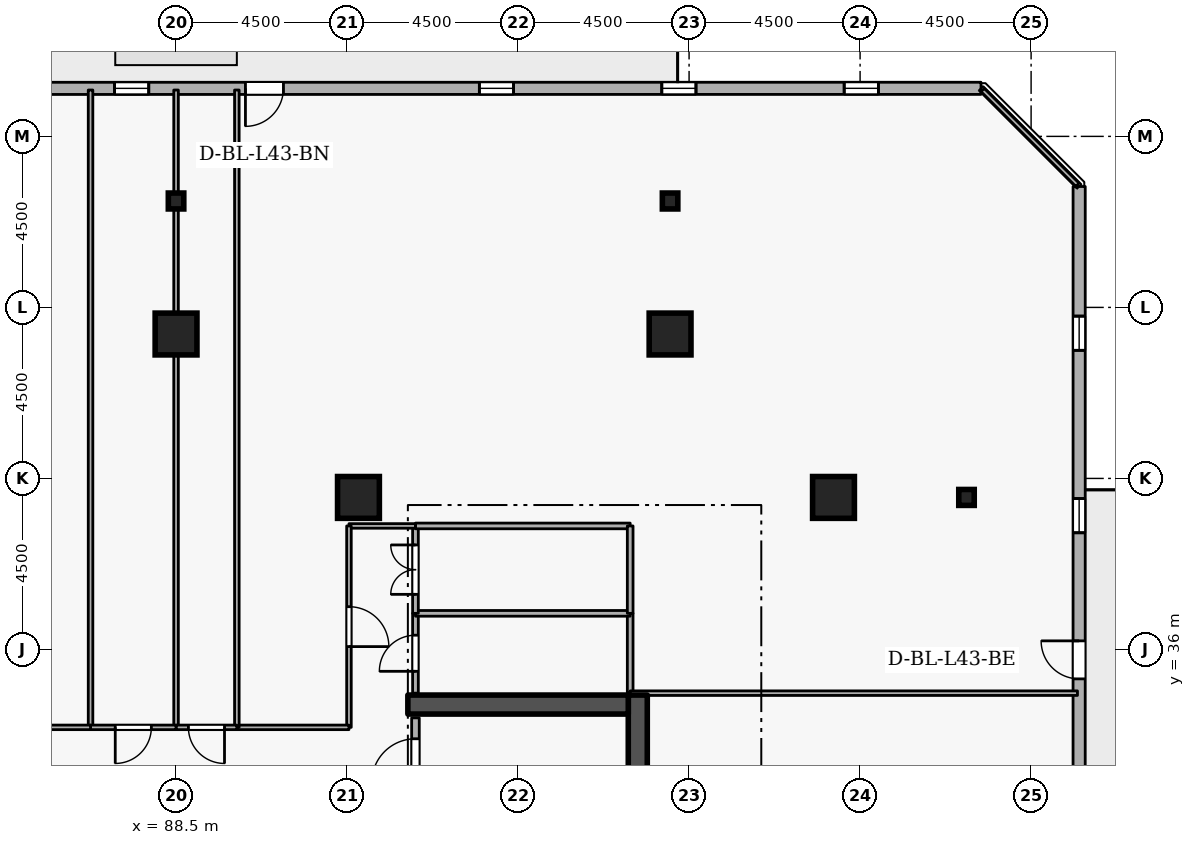
"""IFC4 building model, lengths in metres.
Left out: names, types, materials, properties, quantities, classifications, styles, units other than length and angle.
Written with IfcOpenShell. Run it as: python <this file> out.ifc"""

import sys

from ifc_helpers import new_model, si_unit, direction, frame, frame_2d, origin, origin_2d, place, context, subcontext, project, spatial, rectangle, i_section, extrude, element, fill, save


model = new_model("IFC4")
c1 = context("Model", 3, precision=1e-05, world=origin(), true_north=direction((0.0, 1.0)))
c2 = subcontext(c1, "Body", "Model", "MODEL_VIEW")
j1 = project(units=[si_unit("LENGTHUNIT", "METRE"), si_unit("PLANEANGLEUNIT", "RADIAN")], contexts=[c1])
p1 = place(None, origin())
s1 = spatial("IfcSite", under=j1, at=p1, CompositionType="ELEMENT")
p2 = place(p1, origin())
s2 = spatial("IfcBuilding", under=s1, at=p2, CompositionType="ELEMENT")
p3 = place(p2, frame((0.0, 0.0, 163.5)))
s3 = spatial("IfcBuildingStorey", under=s2, at=p3, CompositionType="ELEMENT", Elevation=163.5)
p4 = place(p3, frame((100.65, 19.2, 0.0), z_axis=(0.0, 0.0, 1.0), x_axis=(0.0, 1.0, 0.0)))
e1 = element("IfcWall", 1, at=p4, inside=s3, PredefinedType="SHEAR", context=c2, shape_type="SweptSolid", body=[
    extrude(rectangle(XDim=15.6, YDim=0.5, at=frame_2d((7.8, 0.0))), origin(), (0.0, 0.0, 1.0), 3.6),
])
p5 = place(p3, frame((94.6, 34.55, 0.0), z_axis=(0.0, 0.0, 1.0), x_axis=(1.0, 0.0, 0.0)))
e2 = element("IfcWall", 2, at=p5, inside=s3, PredefinedType="SHEAR", context=c2, shape_type="SweptSolid", body=[
    extrude(rectangle(XDim=5.8, YDim=0.5, at=frame_2d((2.9, 0.0))), origin(), (0.0, 0.0, 1.0), 3.6),
])
for number, where, z_axis, x_axis in (
    (3, (105.8, 40.0, 0.0), (0.0, 0.0, 1.0), (1.0, 0.0, 0.0)),
    (4, (101.5, 44.3, 0.0), (0.0, 0.0, 1.0), (1.0, 0.0, 0.0)),
    (5, (88.5, 44.3, 0.0), (0.0, 0.0, 1.0), (1.0, 0.0, 0.0)),
    (6, (93.3, 40.0, 0.0), (0.0, 0.0, 1.0), (1.0, 0.0, 0.0)),
):
    element("IfcColumn", number, at=place(p3, frame(where, z_axis=z_axis, x_axis=x_axis)), inside=s3, PredefinedType="COLUMN", context=c2, shape_type="SweptSolid", body=[
        extrude(rectangle(XDim=1.1, YDim=1.1, at=origin_2d()), origin(), (0.0, 0.0, 1.0), 3.6),
    ])
for number, where, z_axis, x_axis in (
    (7, (109.3, 40.0, 0.0), (0.0, 0.0, 1.0), (1.0, 0.0, 0.0)),
    (8, (101.5, 47.8, 0.0), (0.0, 0.0, 1.0), (1.0, 0.0, 0.0)),
    (9, (88.5, 47.8, 0.0), (0.0, 0.0, 1.0), (1.0, 0.0, 0.0)),
):
    element("IfcColumn", number, at=place(p3, frame(where, z_axis=z_axis, x_axis=x_axis)), inside=s3, PredefinedType="COLUMN", context=c2, shape_type="SweptSolid", body=[
        extrude(i_section(OverallWidth=0.407, OverallDepth=0.419, WebThickness=0.031, FlangeThickness=0.049, FilletRadius=0.015, at=origin_2d()), origin(), (0.0, 0.0, 1.0), 3.6),
    ])
p6 = place(p3, frame((112.263, 12.371, 0.0), z_axis=(0.0, 0.0, 1.0), x_axis=(5.4540124e-05, 0.999999998513, 0.0)))
e10 = element("IfcWall", 10, at=p6, inside=s3, PredefinedType="STANDARD", context=c2, shape_type="SweptSolid", body=[
    extrude(rectangle(XDim=35.811, YDim=0.32, at=frame_2d((17.905, 0.0))), origin(), (0.0, 0.0, 1.0), 2.7),
])
p7 = place(p6, frame((22.855, 0.0, 0.0)))
e11 = element("IfcOpeningElement", 11, at=p7, cuts=e10, PredefinedType="OPENING", context=c2, shape_type="SweptSolid", body=[
    extrude(rectangle(XDim=1.0, YDim=2.08, at=frame_2d((0.5, 1.04))), frame((0.0, 0.17, 0.0), z_axis=(0.0, -1.0, 0.0), x_axis=(1.0, 0.0, 0.0)), (0.0, 0.0, 1.0), 0.34),
])
p8 = place(p6, frame((2.7, 0.0, 0.72)))
e12 = element("IfcOpeningElement", 12, at=p8, cuts=e10, PredefinedType="OPENING", context=c2, shape_type="SweptSolid", body=[
    extrude(rectangle(XDim=0.9, YDim=1.75, at=frame_2d((0.45, 0.875))), frame((0.0, 0.17, 0.0), z_axis=(0.0, -1.0, 0.0), x_axis=(1.0, 0.0, 0.0)), (0.0, 0.0, 1.0), 0.34),
])
p9 = place(p6, frame((7.5, 0.0, 0.72)))
e13 = element("IfcOpeningElement", 13, at=p9, cuts=e10, PredefinedType="OPENING", context=c2, shape_type="SweptSolid", body=[
    extrude(rectangle(XDim=0.9, YDim=1.75, at=frame_2d((0.45, 0.875))), frame((0.0, 0.17, 0.0), z_axis=(0.0, -1.0, 0.0), x_axis=(1.0, 0.0, 0.0)), (0.0, 0.0, 1.0), 0.34),
])
p10 = place(p6, frame((12.3, 0.0, 0.72)))
e14 = element("IfcOpeningElement", 14, at=p10, cuts=e10, PredefinedType="OPENING", context=c2, shape_type="SweptSolid", body=[
    extrude(rectangle(XDim=0.9, YDim=1.75, at=frame_2d((0.45, 0.875))), frame((0.0, 0.17, 0.0), z_axis=(0.0, -1.0, 0.0), x_axis=(1.0, 0.0, 0.0)), (0.0, 0.0, 1.0), 0.34),
])
p11 = place(p6, frame((17.1, 0.0, 0.72)))
e15 = element("IfcOpeningElement", 15, at=p11, cuts=e10, PredefinedType="OPENING", context=c2, shape_type="SweptSolid", body=[
    extrude(rectangle(XDim=0.9, YDim=1.75, at=frame_2d((0.45, 0.875))), frame((0.0, 0.17, 0.0), z_axis=(0.0, -1.0, 0.0), x_axis=(1.0, 0.0, 0.0)), (0.0, 0.0, 1.0), 0.34),
])
p12 = place(p6, frame((26.7, 0.0, 0.72)))
e16 = element("IfcOpeningElement", 16, at=p12, cuts=e10, PredefinedType="OPENING", context=c2, shape_type="SweptSolid", body=[
    extrude(rectangle(XDim=0.9, YDim=1.75, at=frame_2d((0.45, 0.875))), frame((0.0, 0.17, 0.0), z_axis=(0.0, -1.0, 0.0), x_axis=(1.0, 0.0, 0.0)), (0.0, 0.0, 1.0), 0.34),
])
p13 = place(p6, frame((31.5, 0.0, 0.72)))
e17 = element("IfcOpeningElement", 17, at=p13, cuts=e10, PredefinedType="OPENING", context=c2, shape_type="SweptSolid", body=[
    extrude(rectangle(XDim=0.9, YDim=1.75, at=frame_2d((0.45, 0.875))), frame((0.0, 0.17, 0.0), z_axis=(0.0, -1.0, 0.0), x_axis=(1.0, 0.0, 0.0)), (0.0, 0.0, 1.0), 0.34),
])
p14 = place(p3, frame((109.681, 50.765, 0.0), z_axis=(0.0, 0.0, 1.0), x_axis=(-0.999999998513, -5.4540124e-05, 0.0)))
e18 = element("IfcWall", 18, at=p14, inside=s3, PredefinedType="STANDARD", context=c2, shape_type="SweptSolid", body=[
    extrude(rectangle(XDim=35.811, YDim=0.32, at=frame_2d((17.905, 0.0))), origin(), (0.0, 0.0, 1.0), 2.7),
])
p15 = place(p14, frame((18.355, 0.0, 0.0)))
e19 = element("IfcOpeningElement", 19, at=p15, cuts=e18, PredefinedType="OPENING", context=c2, shape_type="SweptSolid", body=[
    extrude(rectangle(XDim=1.0, YDim=2.08, at=frame_2d((0.5, 1.04))), frame((0.0, 0.17, 0.0), z_axis=(0.0, -1.0, 0.0), x_axis=(1.0, 0.0, 0.0)), (0.0, 0.0, 1.0), 0.34),
])
p16 = place(p14, frame((2.7, 0.0, 0.72)))
e20 = element("IfcOpeningElement", 20, at=p16, cuts=e18, PredefinedType="OPENING", context=c2, shape_type="SweptSolid", body=[
    extrude(rectangle(XDim=0.9, YDim=1.75, at=frame_2d((0.45, 0.875))), frame((0.0, 0.17, 0.0), z_axis=(0.0, -1.0, 0.0), x_axis=(1.0, 0.0, 0.0)), (0.0, 0.0, 1.0), 0.34),
])
p17 = place(p14, frame((7.5, 0.0, 0.72)))
e21 = element("IfcOpeningElement", 21, at=p17, cuts=e18, PredefinedType="OPENING", context=c2, shape_type="SweptSolid", body=[
    extrude(rectangle(XDim=0.9, YDim=1.75, at=frame_2d((0.45, 0.875))), frame((0.0, 0.17, 0.0), z_axis=(0.0, -1.0, 0.0), x_axis=(1.0, 0.0, 0.0)), (0.0, 0.0, 1.0), 0.34),
])
p18 = place(p14, frame((12.3, 0.0, 0.72)))
e22 = element("IfcOpeningElement", 22, at=p18, cuts=e18, PredefinedType="OPENING", context=c2, shape_type="SweptSolid", body=[
    extrude(rectangle(XDim=0.9, YDim=1.75, at=frame_2d((0.45, 0.875))), frame((0.0, 0.17, 0.0), z_axis=(0.0, -1.0, 0.0), x_axis=(1.0, 0.0, 0.0)), (0.0, 0.0, 1.0), 0.34),
])
p19 = place(p14, frame((21.9, 0.0, 0.72)))
e23 = element("IfcOpeningElement", 23, at=p19, cuts=e18, PredefinedType="OPENING", context=c2, shape_type="SweptSolid", body=[
    extrude(rectangle(XDim=0.9, YDim=1.75, at=frame_2d((0.45, 0.875))), frame((0.0, 0.17, 0.0), z_axis=(0.0, -1.0, 0.0), x_axis=(1.0, 0.0, 0.0)), (0.0, 0.0, 1.0), 0.34),
])
p20 = place(p14, frame((26.7, 0.0, 0.72)))
e24 = element("IfcOpeningElement", 24, at=p20, cuts=e18, PredefinedType="OPENING", context=c2, shape_type="SweptSolid", body=[
    extrude(rectangle(XDim=0.9, YDim=1.75, at=frame_2d((0.45, 0.875))), frame((0.0, 0.17, 0.0), z_axis=(0.0, -1.0, 0.0), x_axis=(1.0, 0.0, 0.0)), (0.0, 0.0, 1.0), 0.34),
])
p21 = place(p14, frame((31.5, 0.0, 0.72)))
e25 = element("IfcOpeningElement", 25, at=p21, cuts=e18, PredefinedType="OPENING", context=c2, shape_type="SweptSolid", body=[
    extrude(rectangle(XDim=0.9, YDim=1.75, at=frame_2d((0.45, 0.875))), frame((0.0, 0.17, 0.0), z_axis=(0.0, -1.0, 0.0), x_axis=(1.0, 0.0, 0.0)), (0.0, 0.0, 1.0), 0.34),
])
p22 = place(p3, frame((94.8, 31.95, 0.0), z_axis=(0.0, 0.0, 1.0), x_axis=(0.0, 1.0, 0.0)))
e26 = element("IfcWall", 26, at=p22, inside=s3, PredefinedType="STANDARD", context=c2, shape_type="SweptSolid", body=[
    extrude(rectangle(XDim=2.25, YDim=0.2, at=frame_2d((1.125, 0.0))), origin(), (0.0, 0.0, 1.0), 3.34),
])
p23 = place(p22, frame((0.55, 0.0, 0.0)))
e27 = element("IfcOpeningElement", 27, at=p23, cuts=e26, PredefinedType="OPENING", context=c2, shape_type="SweptSolid", body=[
    extrude(rectangle(XDim=1.15, YDim=2.1, at=frame_2d((0.575, 1.05))), frame((0.0, 0.11, 0.0), z_axis=(0.0, -1.0, 0.0), x_axis=(1.0, 0.0, 0.0)), (0.0, 0.0, 1.0), 0.22),
])
p24 = place(p3, frame((100.45, 36.95, 0.0), z_axis=(0.0, 0.0, 1.0), x_axis=(0.0, -1.0, 0.0)))
e28 = element("IfcWall", 28, at=p24, inside=s3, PredefinedType="PARTITIONING", context=c2, shape_type="SweptSolid", body=[
    extrude(rectangle(XDim=2.1, YDim=0.15, at=frame_2d((1.05, 0.0))), origin(), (0.0, 0.0, 1.0), 3.34),
])
p25 = place(p3, frame((94.8, 34.85, 0.0), z_axis=(0.0, 0.0, 1.0), x_axis=(0.0, 1.0, 0.0)))
e29 = element("IfcWall", 29, at=p25, inside=s3, PredefinedType="PARTITIONING", context=c2, shape_type="SweptSolid", body=[
    extrude(rectangle(XDim=2.1, YDim=0.15, at=frame_2d((1.05, 0.0))), origin(), (0.0, 0.0, 1.0), 3.34),
])
p26 = place(p25, frame((0.575, 0.0, 0.0)))
e30 = element("IfcOpeningElement", 30, at=p26, cuts=e29, PredefinedType="OPENING", context=c2, shape_type="SweptSolid", body=[
    extrude(rectangle(XDim=0.95, YDim=2.1, at=frame_2d((0.475, 1.05))), frame((0.0, 0.085, 0.0), z_axis=(0.0, -1.0, 0.0), x_axis=(1.0, 0.0, 0.0)), (0.0, 0.0, 1.0), 0.17),
])
p27 = place(p3, frame((94.8, 36.95, 0.0), z_axis=(0.0, 0.0, 1.0), x_axis=(1.0, 0.0, 0.0)))
e31 = element("IfcWall", 31, at=p27, inside=s3, PredefinedType="PARTITIONING", context=c2, shape_type="SweptSolid", body=[
    extrude(rectangle(XDim=5.65, YDim=0.15, at=frame_2d((2.825, 0.0))), origin(), (0.0, 0.0, 1.0), 3.34),
])
p28 = place(p3, frame((94.8, 36.95, 0.0), z_axis=(0.0, 0.0, 1.0), x_axis=(0.0, 1.0, 0.0)))
e32 = element("IfcWall", 32, at=p28, inside=s3, PredefinedType="PARTITIONING", context=c2, shape_type="SweptSolid", body=[
    extrude(rectangle(XDim=2.3, YDim=0.15, at=frame_2d((1.15, 0.0))), origin(), (0.0, 0.0, 1.0), 3.34),
])
p29 = place(p28, frame((0.5, 0.0, 0.0)))
e33 = element("IfcOpeningElement", 33, at=p29, cuts=e32, PredefinedType="OPENING", context=c2, shape_type="SweptSolid", body=[
    extrude(rectangle(XDim=1.3, YDim=2.12, at=frame_2d((0.65, 1.06))), frame((0.0, 0.085, 0.0), z_axis=(0.0, -1.0, 0.0), x_axis=(1.0, 0.0, 0.0)), (0.0, 0.0, 1.0), 0.17),
])
p30 = place(p3, frame((94.8, 39.25, 0.0), z_axis=(0.0, 0.0, 1.0), x_axis=(1.0, 0.0, 0.0)))
e34 = element("IfcWall", 34, at=p30, inside=s3, PredefinedType="PARTITIONING", context=c2, shape_type="SweptSolid", body=[
    extrude(rectangle(XDim=5.65, YDim=0.15, at=frame_2d((2.825, 0.0))), origin(), (0.0, 0.0, 1.0), 3.34),
])
p31 = place(p3, frame((100.45, 39.25, 0.0), z_axis=(0.0, 0.0, 1.0), x_axis=(0.0, -1.0, 0.0)))
e35 = element("IfcWall", 35, at=p31, inside=s3, PredefinedType="PARTITIONING", context=c2, shape_type="SweptSolid", body=[
    extrude(rectangle(XDim=2.3, YDim=0.15, at=frame_2d((1.15, 0.0))), origin(), (0.0, 0.0, 1.0), 3.34),
])
p32 = place(p3, frame((94.8, 39.25, 0.0), z_axis=(0.0, 0.0, 1.0), x_axis=(-1.0, 0.0, 0.0)))
e36 = element("IfcWall", 36, at=p32, inside=s3, PredefinedType="PARTITIONING", context=c2, shape_type="SweptSolid", body=[
    extrude(rectangle(XDim=1.75, YDim=0.12, at=frame_2d((0.875, 0.0))), origin(), (0.0, 0.0, 1.0), 3.34),
])
p33 = place(p3, frame((93.05, 39.25, 0.0), z_axis=(0.0, 0.0, 1.0), x_axis=(0.0, -1.0, 0.0)))
e37 = element("IfcWall", 37, at=p33, inside=s3, PredefinedType="PARTITIONING", context=c2, shape_type="SweptSolid", body=[
    extrude(rectangle(XDim=5.3, YDim=0.12, at=frame_2d((2.65, 0.0))), origin(), (0.0, 0.0, 1.0), 3.34),
])
p34 = place(p33, frame((2.125, 0.0, 0.0)))
e38 = element("IfcOpeningElement", 38, at=p34, cuts=e37, PredefinedType="OPENING", context=c2, shape_type="SweptSolid", body=[
    extrude(rectangle(XDim=1.05, YDim=2.1, at=frame_2d((0.525, 1.05))), frame((0.0, 0.07, 0.0), z_axis=(0.0, -1.0, 0.0), x_axis=(1.0, 0.0, 0.0)), (0.0, 0.0, 1.0), 0.14),
])
p35 = place(p3, frame((93.05, 33.95, 0.0), z_axis=(0.0, 0.0, 1.0), x_axis=(-1.0, 0.0, 0.0)))
e39 = element("IfcWall", 39, at=p35, inside=s3, PredefinedType="PARTITIONING", context=c2, shape_type="SweptSolid", body=[
    extrude(rectangle(XDim=2.95, YDim=0.12, at=frame_2d((1.475, 0.0))), origin(), (0.0, 0.0, 1.0), 3.34),
])
p36 = place(p3, frame((90.1, 33.95, 0.0), z_axis=(0.0, 0.0, 1.0), x_axis=(0.0, 1.0, 0.0)))
e40 = element("IfcWall", 40, at=p36, inside=s3, PredefinedType="PARTITIONING", context=c2, shape_type="SweptSolid", body=[
    extrude(rectangle(XDim=16.77, YDim=0.12, at=frame_2d((8.385, 0.0))), origin(), (0.0, 0.0, 1.0), 3.34),
])
p37 = place(p3, frame((109.725, 50.72, 0.0), z_axis=(0.0, 0.0, 1.0), x_axis=(0.707106781187, -0.707106781187, 0.0)))
e41 = element("IfcWall", 41, at=p37, inside=s3, PredefinedType="PARTITIONING", context=c2, shape_type="SweptSolid", body=[
    extrude(rectangle(XDim=3.528, YDim=0.12, at=frame_2d((1.764, 0.0))), origin(), (0.0, 0.0, 1.0), 3.34),
])
p38 = place(p3, frame((112.22, 34.85, 0.0), z_axis=(0.0, 0.0, 1.0), x_axis=(-1.0, 0.0, 0.0)))
e42 = element("IfcWall", 42, at=p38, inside=s3, PredefinedType="PARTITIONING", context=c2, shape_type="SweptSolid", body=[
    extrude(rectangle(XDim=11.77, YDim=0.12, at=frame_2d((5.885, 0.0))), origin(), (0.0, 0.0, 1.0), 2.545),
])
p39 = place(p3, frame((88.5, 33.95, 0.0), z_axis=(0.0, 0.0, 1.0), x_axis=(0.0, 1.0, 0.0)))
e43 = element("IfcWall", 43, at=p39, inside=s3, PredefinedType="PARTITIONING", context=c2, shape_type="SweptSolid", body=[
    extrude(rectangle(XDim=16.77, YDim=0.12, at=frame_2d((8.385, 0.0))), origin(), (0.0, 0.0, 1.0), 2.878),
])
p40 = place(p3, frame((90.1, 33.95, 0.0), z_axis=(0.0, 0.0, 1.0), x_axis=(-1.0, 0.0, 0.0)))
e44 = element("IfcWall", 44, at=p40, inside=s3, PredefinedType="PARTITIONING", context=c2, shape_type="SweptSolid", body=[
    extrude(rectangle(XDim=1.6, YDim=0.12, at=frame_2d((0.8, 0.0))), origin(), (0.0, 0.0, 1.0), 3.34),
])
p41 = place(p40, frame((0.325, 0.0, 0.0)))
e45 = element("IfcOpeningElement", 45, at=p41, cuts=e44, PredefinedType="OPENING", context=c2, shape_type="SweptSolid", body=[
    extrude(rectangle(XDim=0.95, YDim=2.1, at=frame_2d((0.475, 1.05))), frame((0.0, 0.07, 0.0), z_axis=(0.0, -1.0, 0.0), x_axis=(1.0, 0.0, 0.0)), (0.0, 0.0, 1.0), 0.14),
])
p42 = place(p3, frame((86.25, 33.95, 0.0), z_axis=(0.0, 0.0, 1.0), x_axis=(0.0, 1.0, 0.0)))
e46 = element("IfcWall", 46, at=p42, inside=s3, PredefinedType="PARTITIONING", context=c2, shape_type="SweptSolid", body=[
    extrude(rectangle(XDim=16.77, YDim=0.12, at=frame_2d((8.385, 0.0))), origin(), (0.0, 0.0, 1.0), 3.34),
])
p43 = place(p3, frame((88.5, 33.95, 0.0), z_axis=(0.0, 0.0, 1.0), x_axis=(-1.0, 0.0, 0.0)))
e47 = element("IfcWall", 47, at=p43, inside=s3, PredefinedType="PARTITIONING", context=c2, shape_type="SweptSolid", body=[
    extrude(rectangle(XDim=2.25, YDim=0.12, at=frame_2d((1.125, 0.0))), origin(), (0.0, 0.0, 1.0), 3.34),
])
p44 = place(p43, frame((0.65, 0.0, 0.0)))
e48 = element("IfcOpeningElement", 48, at=p44, cuts=e47, PredefinedType="OPENING", context=c2, shape_type="SweptSolid", body=[
    extrude(rectangle(XDim=0.95, YDim=2.1, at=frame_2d((0.475, 1.05))), frame((0.0, 0.07, 0.0), z_axis=(0.0, -1.0, 0.0), x_axis=(1.0, 0.0, 0.0)), (0.0, 0.0, 1.0), 0.14),
])
p45 = place(p3, frame((86.25, 33.95, 0.0), z_axis=(0.0, 0.0, 1.0), x_axis=(-1.0, 0.0, 0.0)))
e49 = element("IfcWall", 49, at=p45, inside=s3, PredefinedType="PARTITIONING", context=c2, shape_type="SweptSolid", body=[
    extrude(rectangle(XDim=2.3, YDim=0.12, at=frame_2d((1.15, 0.0))), origin(), (0.0, 0.0, 1.0), 3.34),
])
p46 = place(p7, origin())
e50 = element("IfcDoor", 50, at=p46, inside=s3, OperationType="SINGLE_SWING_RIGHT", PredefinedType="DOOR", context=c2, shape_type="SweptSolid", body=[
    extrude(rectangle(XDim=1.0, YDim=2.08, at=frame_2d((0.5, 1.04))), frame((0.0, 0.025, 0.0), z_axis=(0.0, -1.0, 0.0), x_axis=(1.0, 0.0, 0.0)), (0.0, 0.0, 1.0), 0.05),
])
fill(e11, e50)
p47 = place(p12, origin())
e51 = element("IfcWindow", 51, at=p47, inside=s3, PartitioningType="SINGLE_PANEL", PredefinedType="WINDOW", context=c2, shape_type="SweptSolid", body=[
    extrude(rectangle(XDim=0.9, YDim=1.75, at=frame_2d((0.45, 0.875))), frame((0.0, 0.03, 0.0), z_axis=(0.0, -1.0, 0.0), x_axis=(1.0, 0.0, 0.0)), (0.0, 0.0, 1.0), 0.06),
])
fill(e16, e51)
p48 = place(p13, origin())
e52 = element("IfcWindow", 52, at=p48, inside=s3, PartitioningType="SINGLE_PANEL", PredefinedType="WINDOW", context=c2, shape_type="SweptSolid", body=[
    extrude(rectangle(XDim=0.9, YDim=1.75, at=frame_2d((0.45, 0.875))), frame((0.0, 0.03, 0.0), z_axis=(0.0, -1.0, 0.0), x_axis=(1.0, 0.0, 0.0)), (0.0, 0.0, 1.0), 0.06),
])
fill(e17, e52)
p49 = place(p15, origin())
e53 = element("IfcDoor", 53, at=p49, inside=s3, OperationType="SINGLE_SWING_RIGHT", PredefinedType="DOOR", context=c2, shape_type="SweptSolid", body=[
    extrude(rectangle(XDim=1.0, YDim=2.08, at=frame_2d((0.5, 1.04))), frame((0.0, 0.025, 0.0), z_axis=(0.0, -1.0, 0.0), x_axis=(1.0, 0.0, 0.0)), (0.0, 0.0, 1.0), 0.05),
])
fill(e19, e53)
p50 = place(p16, origin())
e54 = element("IfcWindow", 54, at=p50, inside=s3, PartitioningType="SINGLE_PANEL", PredefinedType="WINDOW", context=c2, shape_type="SweptSolid", body=[
    extrude(rectangle(XDim=0.9, YDim=1.75, at=frame_2d((0.45, 0.875))), frame((0.0, 0.03, 0.0), z_axis=(0.0, -1.0, 0.0), x_axis=(1.0, 0.0, 0.0)), (0.0, 0.0, 1.0), 0.06),
])
fill(e20, e54)
p51 = place(p17, origin())
e55 = element("IfcWindow", 55, at=p51, inside=s3, PartitioningType="SINGLE_PANEL", PredefinedType="WINDOW", context=c2, shape_type="SweptSolid", body=[
    extrude(rectangle(XDim=0.9, YDim=1.75, at=frame_2d((0.45, 0.875))), frame((0.0, 0.03, 0.0), z_axis=(0.0, -1.0, 0.0), x_axis=(1.0, 0.0, 0.0)), (0.0, 0.0, 1.0), 0.06),
])
fill(e21, e55)
p52 = place(p18, origin())
e56 = element("IfcWindow", 56, at=p52, inside=s3, PartitioningType="SINGLE_PANEL", PredefinedType="WINDOW", context=c2, shape_type="SweptSolid", body=[
    extrude(rectangle(XDim=0.9, YDim=1.75, at=frame_2d((0.45, 0.875))), frame((0.0, 0.03, 0.0), z_axis=(0.0, -1.0, 0.0), x_axis=(1.0, 0.0, 0.0)), (0.0, 0.0, 1.0), 0.06),
])
fill(e22, e56)
p53 = place(p19, origin())
e57 = element("IfcWindow", 57, at=p53, inside=s3, PartitioningType="SINGLE_PANEL", PredefinedType="WINDOW", context=c2, shape_type="SweptSolid", body=[
    extrude(rectangle(XDim=0.9, YDim=1.75, at=frame_2d((0.45, 0.875))), frame((0.0, 0.03, 0.0), z_axis=(0.0, -1.0, 0.0), x_axis=(1.0, 0.0, 0.0)), (0.0, 0.0, 1.0), 0.06),
])
fill(e23, e57)
p54 = place(p23, origin())
e58 = element("IfcDoor", 58, at=p54, inside=s3, OperationType="SINGLE_SWING_LEFT", PredefinedType="DOOR", context=c2, shape_type="SweptSolid", body=[
    extrude(rectangle(XDim=1.15, YDim=2.1, at=frame_2d((0.575, 1.05))), frame((0.0, 0.025, 0.0), z_axis=(0.0, -1.0, 0.0), x_axis=(1.0, 0.0, 0.0)), (0.0, 0.0, 1.0), 0.05),
])
fill(e27, e58)
p55 = place(p26, origin())
e59 = element("IfcDoor", 59, at=p55, inside=s3, OperationType="SINGLE_SWING_LEFT", PredefinedType="DOOR", context=c2, shape_type="SweptSolid", body=[
    extrude(rectangle(XDim=0.95, YDim=2.1, at=frame_2d((0.475, 1.05))), frame((0.0, 0.025, 0.0), z_axis=(0.0, -1.0, 0.0), x_axis=(1.0, 0.0, 0.0)), (0.0, 0.0, 1.0), 0.05),
])
fill(e30, e59)
p56 = place(p29, origin())
e60 = element("IfcDoor", 60, at=p56, inside=s3, OperationType="DOUBLE_DOOR_SINGLE_SWING", PredefinedType="DOOR", context=c2, shape_type="SweptSolid", body=[
    extrude(rectangle(XDim=1.3, YDim=2.12, at=frame_2d((0.65, 1.06))), frame((0.0, 0.025, 0.0), z_axis=(0.0, -1.0, 0.0), x_axis=(1.0, 0.0, 0.0)), (0.0, 0.0, 1.0), 0.05),
])
fill(e33, e60)
p57 = place(p34, origin())
e61 = element("IfcDoor", 61, at=p57, inside=s3, OperationType="SINGLE_SWING_RIGHT", PredefinedType="DOOR", context=c2, shape_type="SweptSolid", body=[
    extrude(rectangle(XDim=1.05, YDim=2.1, at=frame_2d((0.525, 1.05))), frame((0.0, 0.025, 0.0), z_axis=(0.0, -1.0, 0.0), x_axis=(1.0, 0.0, 0.0)), (0.0, 0.0, 1.0), 0.05),
])
fill(e38, e61)
p58 = place(p41, origin())
e62 = element("IfcDoor", 62, at=p58, inside=s3, OperationType="SINGLE_SWING_LEFT", PredefinedType="DOOR", context=c2, shape_type="SweptSolid", body=[
    extrude(rectangle(XDim=0.95, YDim=2.1, at=frame_2d((0.475, 1.05))), frame((0.0, 0.025, 0.0), z_axis=(0.0, -1.0, 0.0), x_axis=(1.0, 0.0, 0.0)), (0.0, 0.0, 1.0), 0.05),
])
fill(e45, e62)
p59 = place(p44, origin())
e63 = element("IfcDoor", 63, at=p59, inside=s3, OperationType="SINGLE_SWING_RIGHT", PredefinedType="DOOR", context=c2, shape_type="SweptSolid", body=[
    extrude(rectangle(XDim=0.95, YDim=2.1, at=frame_2d((0.475, 1.05))), frame((0.0, 0.025, 0.0), z_axis=(0.0, -1.0, 0.0), x_axis=(1.0, 0.0, 0.0)), (0.0, 0.0, 1.0), 0.05),
])
fill(e48, e63)
save(model, sys.argv[1])
